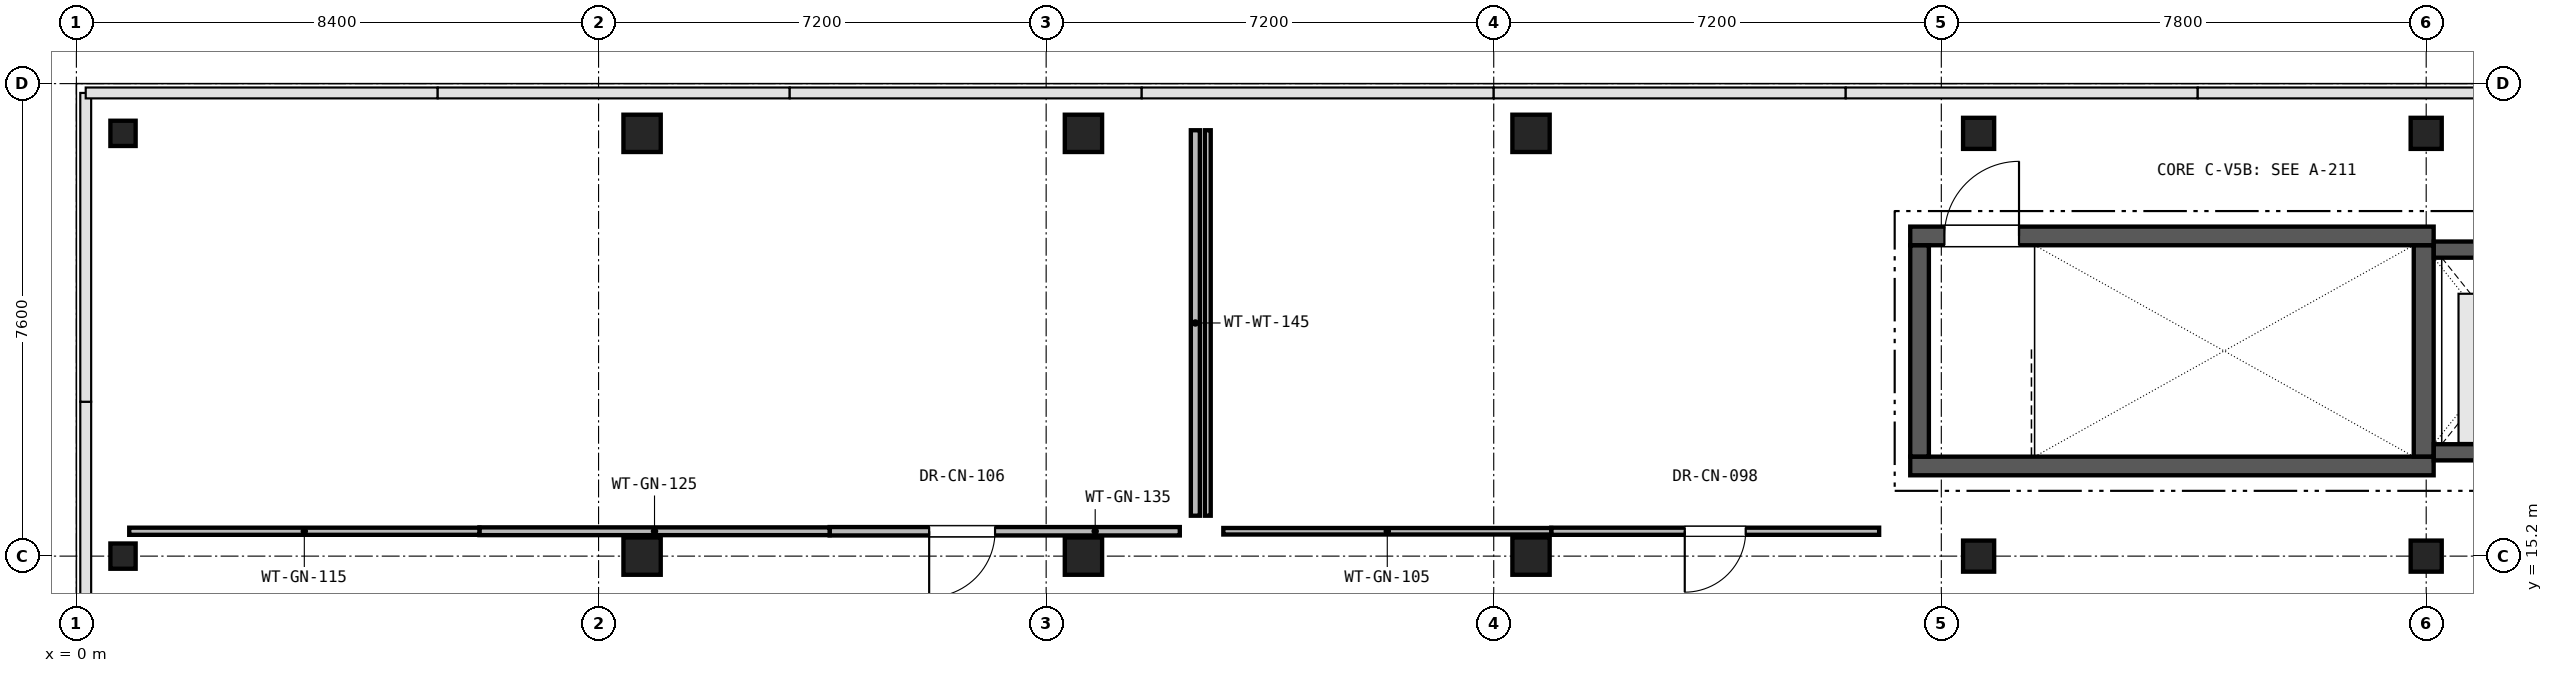
"""IFC4 building model, lengths in metres.
Left out: names, types, materials, properties, quantities, classifications, styles, units other than length and angle.
Written with IfcOpenShell. Run it as: python <this file> out.ifc"""

import sys

from ifc_helpers import new_model, si_unit, direction, frame, frame_2d, origin, origin_2d, place, context, subcontext, project, spatial, rectangle, hollow_circle, extrude, element, fill, save


model = new_model("IFC4")
c1 = context("Model", 3, precision=1e-05, world=origin(), true_north=direction((0.0, 1.0)))
c2 = subcontext(c1, "Body", "Model", "MODEL_VIEW")
j1 = project(units=[si_unit("LENGTHUNIT", "METRE"), si_unit("PLANEANGLEUNIT", "RADIAN")], contexts=[c1])
p1 = place(None, origin())
s1 = spatial("IfcSite", under=j1, at=p1, CompositionType="ELEMENT")
p2 = place(p1, origin())
s2 = spatial("IfcBuilding", under=s1, at=p2, CompositionType="ELEMENT")
p3 = place(p2, frame((0.0, 0.0, 21.76)))
s3 = spatial("IfcBuildingStorey", under=s2, at=p3, CompositionType="ELEMENT", Elevation=21.76)
for number, where, z_axis, x_axis in (
    (1, (0.75, 15.2, 0.0), (0.0, 0.0, 1.0), (1.0, 0.0, 0.0)),
    (2, (0.75, 22.0, 0.0), (0.0, 0.0, 1.0), (1.0, 0.0, 0.0)),
):
    element("IfcColumn", number, at=place(p3, frame(where, z_axis=z_axis, x_axis=x_axis)), inside=s3, PredefinedType="COLUMN", context=c2, shape_type="SweptSolid", body=[
        extrude(hollow_circle(Radius=0.203, WallThickness=0.016, at=origin_2d()), origin(), (0.0, 0.0, 1.0), 4.08),
    ])
for number, where, z_axis, x_axis in (
    (3, (9.1, 15.2, 0.0), (0.0, 0.0, 1.0), (1.0, 0.0, 0.0)),
    (4, (9.1, 22.0, 0.0), (0.0, 0.0, 1.0), (1.0, 0.0, 0.0)),
    (5, (16.2, 15.2, 0.0), (0.0, 0.0, 1.0), (1.0, 0.0, 0.0)),
    (6, (16.2, 22.0, 0.0), (0.0, 0.0, 1.0), (1.0, 0.0, 0.0)),
    (7, (23.4, 15.2, 0.0), (0.0, 0.0, 1.0), (1.0, 0.0, 0.0)),
    (8, (23.4, 22.0, 0.0), (0.0, 0.0, 1.0), (1.0, 0.0, 0.0)),
):
    element("IfcColumn", number, at=place(p3, frame(where, z_axis=z_axis, x_axis=x_axis)), inside=s3, PredefinedType="COLUMN", context=c2, shape_type="SweptSolid", body=[
        extrude(rectangle(XDim=0.6, YDim=0.6, at=origin_2d()), origin(), (0.0, 0.0, 1.0), 4.08),
    ])
for number, where, z_axis, x_axis in (
    (9, (30.6, 15.2, 0.0), (0.0, 0.0, 1.0), (1.0, 0.0, 0.0)),
    (10, (30.6, 22.0, 0.0), (0.0, 0.0, 1.0), (1.0, 0.0, 0.0)),
    (11, (37.8, 15.2, 0.0), (0.0, 0.0, 1.0), (1.0, 0.0, 0.0)),
    (12, (37.8, 22.0, 0.0), (0.0, 0.0, 1.0), (1.0, 0.0, 0.0)),
):
    element("IfcColumn", number, at=place(p3, frame(where, z_axis=z_axis, x_axis=x_axis)), inside=s3, PredefinedType="COLUMN", context=c2, shape_type="SweptSolid", body=[
        extrude(rectangle(XDim=0.5, YDim=0.5, at=origin_2d()), origin(), (0.0, 0.0, 1.0), 4.08),
    ])
p4 = place(p3, frame((45.47, 22.67, 4.08), z_axis=(0.0, 0.0, 1.0), x_axis=(-1.0, 0.0, 0.0)))
e13 = element("IfcWall", 13, at=p4, inside=s3, PredefinedType="PARAPET", context=c2, shape_type="SweptSolid", body=[
    extrude(rectangle(XDim=45.34, YDim=0.245, at=frame_2d((22.67, 0.0))), origin(), (0.0, 0.0, 1.0), 1.2),
])
p5 = place(p3, frame((0.13, 22.52, 4.08), z_axis=(0.0, 0.0, 1.0), x_axis=(0.0, -1.0, 0.0)))
e14 = element("IfcWall", 14, at=p5, inside=s3, PredefinedType="PARAPET", context=c2, shape_type="SweptSolid", body=[
    extrude(rectangle(XDim=14.64, YDim=0.245, at=frame_2d((7.32, 0.0))), origin(), (0.0, 0.0, 1.0), 1.2),
])
p6 = place(p3, frame((29.5, 16.65, 0.0), z_axis=(0.0, 0.0, 1.0), x_axis=(1.0, 0.0, 0.0)))
e15 = element("IfcWall", 15, at=p6, inside=s3, PredefinedType="SHEAR", context=c2, shape_type="SweptSolid", body=[
    extrude(rectangle(XDim=8.42, YDim=0.3, at=frame_2d((4.21, 0.0))), origin(), (0.0, 0.0, 1.0), 3.81),
])
p7 = place(p3, frame((29.5, 20.35, 0.0), z_axis=(0.0, 0.0, 1.0), x_axis=(1.0, 0.0, 0.0)))
e16 = element("IfcWall", 16, at=p7, inside=s3, PredefinedType="SHEAR", context=c2, shape_type="SweptSolid", body=[
    extrude(rectangle(XDim=8.42, YDim=0.3, at=frame_2d((4.21, 0.0))), origin(), (0.0, 0.0, 1.0), 3.81),
])
p8 = place(p7, frame((0.55, 0.0, 0.0)))
e17 = element("IfcOpeningElement", 17, at=p8, cuts=e16, PredefinedType="OPENING", context=c2, shape_type="SweptSolid", body=[
    extrude(rectangle(XDim=1.2, YDim=2.2, at=frame_2d((0.6, 1.1))), frame((0.0, 0.16, 0.0), z_axis=(0.0, -1.0, 0.0), x_axis=(1.0, 0.0, 0.0)), (0.0, 0.0, 1.0), 0.32),
])
p9 = place(p3, frame((29.65, 16.802, 0.0), z_axis=(0.0, 0.0, 1.0), x_axis=(0.0, 1.0, 0.0)))
e18 = element("IfcWall", 18, at=p9, inside=s3, PredefinedType="SHEAR", context=c2, shape_type="SweptSolid", body=[
    extrude(rectangle(XDim=3.396, YDim=0.3, at=frame_2d((1.698, 0.0))), origin(), (0.0, 0.0, 1.0), 3.81),
])
p10 = place(p3, frame((37.76, 16.802, 0.0), z_axis=(0.0, 0.0, 1.0), x_axis=(0.0, 1.0, 0.0)))
e19 = element("IfcWall", 19, at=p10, inside=s3, PredefinedType="SHEAR", context=c2, shape_type="SweptSolid", body=[
    extrude(rectangle(XDim=3.396, YDim=0.32, at=frame_2d((1.698, 0.0))), origin(), (0.0, 0.0, 1.0), 3.81),
])
p11 = place(p3, frame((37.922, 16.87, 0.0), z_axis=(0.0, 0.0, 1.0), x_axis=(1.0, 0.0, 0.0)))
e20 = element("IfcWall", 20, at=p11, inside=s3, PredefinedType="SHEAR", context=c2, shape_type="SweptSolid", body=[
    extrude(rectangle(XDim=2.658, YDim=0.26, at=frame_2d((1.329, 0.0))), origin(), (0.0, 0.0, 1.0), 3.81),
])
p12 = place(p3, frame((37.922, 20.13, 0.0), z_axis=(0.0, 0.0, 1.0), x_axis=(1.0, 0.0, 0.0)))
e21 = element("IfcWall", 21, at=p12, inside=s3, PredefinedType="SHEAR", context=c2, shape_type="SweptSolid", body=[
    extrude(rectangle(XDim=2.658, YDim=0.26, at=frame_2d((1.329, 0.0))), origin(), (0.0, 0.0, 1.0), 3.81),
])
p13 = place(p12, frame((0.679, 0.0, 0.0)))
e22 = element("IfcOpeningElement", 22, at=p13, cuts=e21, PredefinedType="OPENING", context=c2, shape_type="SweptSolid", body=[
    extrude(rectangle(XDim=1.3, YDim=2.2, at=frame_2d((0.65, 1.1))), frame((0.0, 0.14, 0.0), z_axis=(0.0, -1.0, 0.0), x_axis=(1.0, 0.0, 0.0)), (0.0, 0.0, 1.0), 0.28),
])
p14 = place(p3, frame((18.0, 22.05, 0.0), z_axis=(0.0, 0.0, 1.0), x_axis=(0.0, -1.0, 0.0)))
e23 = element("IfcWall", 23, at=p14, inside=s3, PredefinedType="PARTITIONING", context=c2, shape_type="SweptSolid", body=[
    extrude(rectangle(XDim=6.2, YDim=0.145, at=frame_2d((3.1, 0.0))), origin(), (0.0, 0.0, 1.0), 2.86),
])
p15 = place(p3, frame((17.75, 15.6, 0.0), z_axis=(0.0, 0.0, 1.0), x_axis=(-1.0, 0.0, 0.0)))
e24 = element("IfcWall", 24, at=p15, inside=s3, PredefinedType="PARTITIONING", context=c2, shape_type="SweptSolid", body=[
    extrude(rectangle(XDim=5.633, YDim=0.135, at=frame_2d((2.816, 0.0))), origin(), (0.0, 0.0, 1.0), 2.86),
])
p16 = place(p15, frame((2.972, 0.0, 0.0)))
e25 = element("IfcOpeningElement", 25, at=p16, cuts=e24, PredefinedType="OPENING", context=c2, shape_type="SweptSolid", body=[
    extrude(rectangle(XDim=1.06, YDim=2.15, at=frame_2d((0.53, 1.075))), frame((0.0, 0.077, 0.0), z_axis=(0.0, -1.0, 0.0), x_axis=(1.0, 0.0, 0.0)), (0.0, 0.0, 1.0), 0.155),
])
p17 = place(p3, frame((12.117, 15.6, 0.0), z_axis=(0.0, 0.0, 1.0), x_axis=(-1.0, 0.0, 0.0)))
e26 = element("IfcWall", 26, at=p17, inside=s3, PredefinedType="PARTITIONING", context=c2, shape_type="SweptSolid", body=[
    extrude(rectangle(XDim=5.634, YDim=0.125, at=frame_2d((2.817, 0.0))), origin(), (0.0, 0.0, 1.0), 2.86),
])
p18 = place(p3, frame((6.483, 15.6, 0.0), z_axis=(0.0, 0.0, 1.0), x_axis=(-1.0, 0.0, 0.0)))
e27 = element("IfcWall", 27, at=p18, inside=s3, PredefinedType="PARTITIONING", context=c2, shape_type="SweptSolid", body=[
    extrude(rectangle(XDim=5.633, YDim=0.115, at=frame_2d((2.816, 0.0))), origin(), (0.0, 0.0, 1.0), 2.86),
])
p19 = place(p3, frame((29.0, 15.6, 0.0), z_axis=(0.0, 0.0, 1.0), x_axis=(-1.0, 0.0, 0.0)))
e28 = element("IfcWall", 28, at=p19, inside=s3, PredefinedType="PARTITIONING", context=c2, shape_type="SweptSolid", body=[
    extrude(rectangle(XDim=5.275, YDim=0.115, at=frame_2d((2.637, 0.0))), origin(), (0.0, 0.0, 1.0), 2.86),
])
p20 = place(p19, frame((2.147, 0.0, 0.0)))
e29 = element("IfcOpeningElement", 29, at=p20, cuts=e28, PredefinedType="OPENING", context=c2, shape_type="SweptSolid", body=[
    extrude(rectangle(XDim=0.98, YDim=2.15, at=frame_2d((0.49, 1.075))), frame((0.0, 0.067, 0.0), z_axis=(0.0, -1.0, 0.0), x_axis=(1.0, 0.0, 0.0)), (0.0, 0.0, 1.0), 0.135),
])
p21 = place(p3, frame((23.725, 15.6, 0.0), z_axis=(0.0, 0.0, 1.0), x_axis=(-1.0, 0.0, 0.0)))
e30 = element("IfcWall", 30, at=p21, inside=s3, PredefinedType="PARTITIONING", context=c2, shape_type="SweptSolid", body=[
    extrude(rectangle(XDim=5.275, YDim=0.105, at=frame_2d((2.638, 0.0))), origin(), (0.0, 0.0, 1.0), 2.86),
])
p22 = place(p3, frame((18.2, 15.85, 0.0), z_axis=(0.0, 0.0, 1.0), x_axis=(0.0, 1.0, 0.0)))
e31 = element("IfcWall", 31, at=p22, inside=s3, PredefinedType="PARTITIONING", context=c2, shape_type="SweptSolid", body=[
    extrude(rectangle(XDim=6.2, YDim=0.095, at=frame_2d((3.1, 0.0))), origin(), (0.0, 0.0, 1.0), 2.86),
])
p23 = place(p8, origin())
e32 = element("IfcDoor", 32, at=p23, inside=s3, OperationType="SINGLE_SWING_RIGHT", PredefinedType="DOOR", context=c2, shape_type="SweptSolid", body=[
    extrude(rectangle(XDim=1.2, YDim=2.2, at=frame_2d((0.6, 1.1))), frame((0.0, 0.025, 0.0), z_axis=(0.0, -1.0, 0.0), x_axis=(1.0, 0.0, 0.0)), (0.0, 0.0, 1.0), 0.05),
])
fill(e17, e32)
p24 = place(p16, origin())
e33 = element("IfcDoor", 33, at=p24, inside=s3, OperationType="SINGLE_SWING_RIGHT", PredefinedType="DOOR", context=c2, shape_type="SweptSolid", body=[
    extrude(rectangle(XDim=1.06, YDim=2.15, at=frame_2d((0.53, 1.075))), frame((0.0, 0.025, 0.0), z_axis=(0.0, -1.0, 0.0), x_axis=(1.0, 0.0, 0.0)), (0.0, 0.0, 1.0), 0.05),
])
fill(e25, e33)
p25 = place(p20, origin())
e34 = element("IfcDoor", 34, at=p25, inside=s3, OperationType="SINGLE_SWING_RIGHT", PredefinedType="DOOR", context=c2, shape_type="SweptSolid", body=[
    extrude(rectangle(XDim=0.98, YDim=2.15, at=frame_2d((0.49, 1.075))), frame((0.0, 0.025, 0.0), z_axis=(0.0, -1.0, 0.0), x_axis=(1.0, 0.0, 0.0)), (0.0, 0.0, 1.0), 0.05),
])
fill(e29, e34)
save(model, sys.argv[1])
